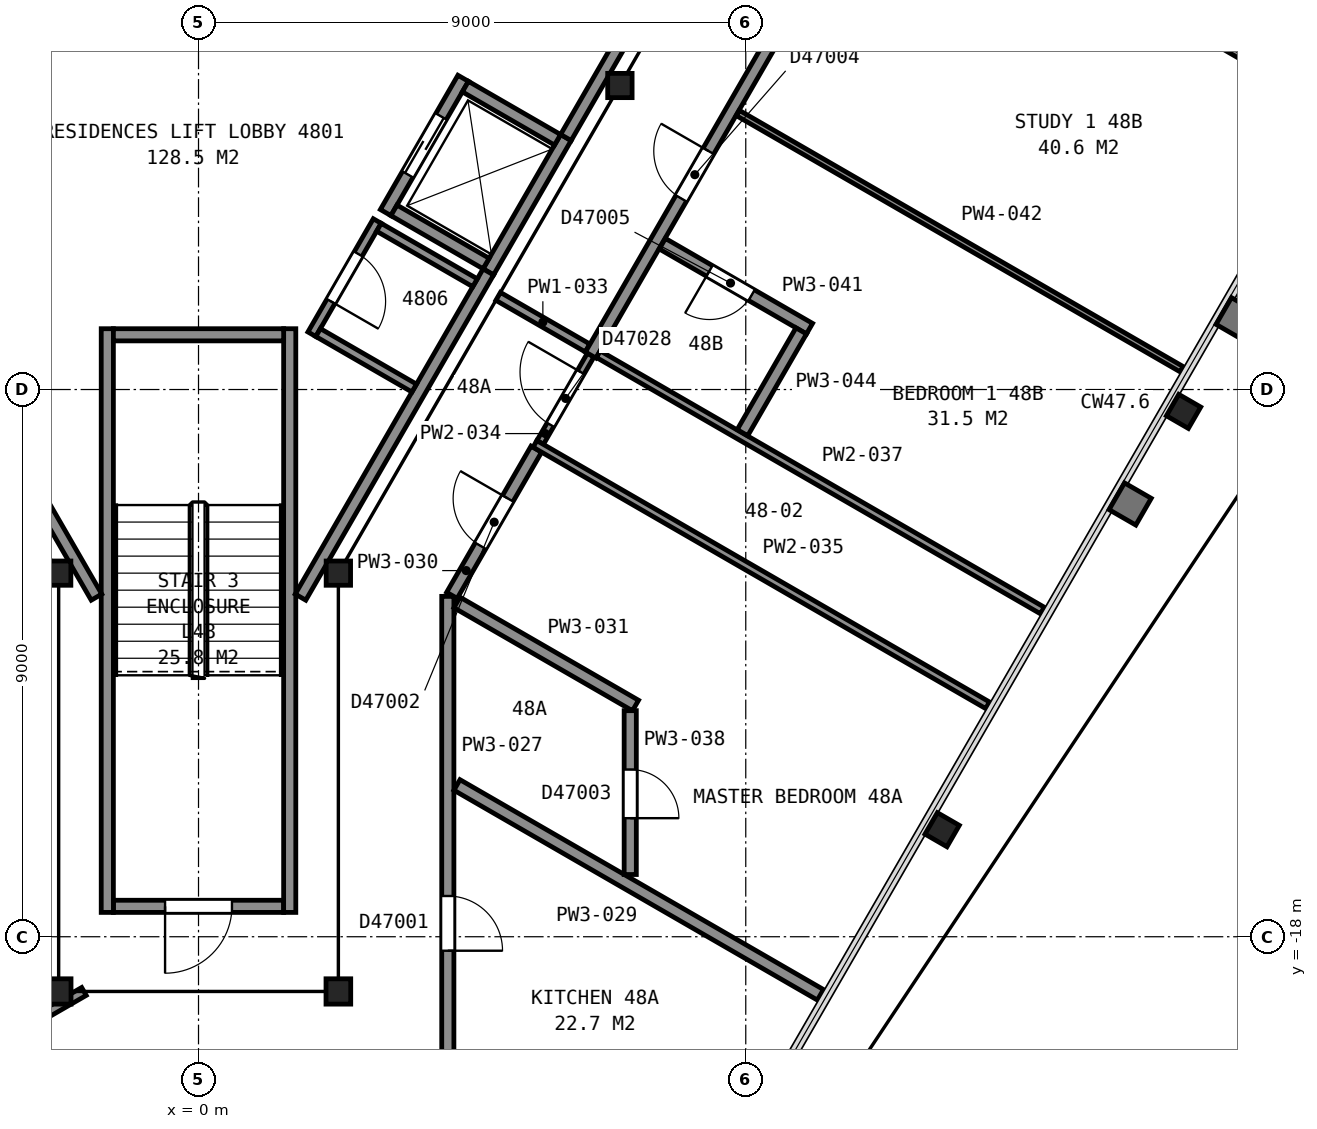
"""IFC4 building model, lengths in metres.
Left out: names, types, materials, properties, quantities, classifications, styles, units other than length and angle.
Written with IfcOpenShell. Run it as: python <this file> out.ifc"""

import sys

from ifc_helpers import new_model, si_unit, direction, frame, frame_2d, origin, origin_2d, place, context, subcontext, project, spatial, rectangle, i_section, extrude, element, fill, save


model = new_model("IFC4")
c1 = context("Model", 3, precision=1e-05, world=origin(), true_north=direction((0.0, 1.0)))
c2 = subcontext(c1, "Body", "Model", "MODEL_VIEW")
j1 = project(units=[si_unit("LENGTHUNIT", "METRE"), si_unit("PLANEANGLEUNIT", "RADIAN")], contexts=[c1])
p1 = place(None, origin())
s1 = spatial("IfcSite", under=j1, at=p1, CompositionType="ELEMENT")
p2 = place(p1, origin())
s2 = spatial("IfcBuilding", under=s1, at=p2, CompositionType="ELEMENT")
p3 = place(p2, frame((0.0, 0.0, 193.2)))
s3 = spatial("IfcBuildingStorey", under=s2, at=p3, CompositionType="ELEMENT", Elevation=193.2)
for number, where, z_axis, x_axis in (
    (1, (12.23, -16.24, 0.0), (0.0, 0.0, 1.0), (-0.5, -0.866, 0.0)),
    (2, (16.2, -9.36, 0.0), (0.0, 0.0, 1.0), (-0.5, -0.866, 0.0)),
):
    element("IfcColumn", number, at=place(p3, frame(where, z_axis=z_axis, x_axis=x_axis)), inside=s3, PredefinedType="COLUMN", context=c2, shape_type="SweptSolid", body=[
        extrude(i_section(OverallWidth=0.406, OverallDepth=0.417, WebThickness=0.03, FlangeThickness=0.048, FilletRadius=0.015, at=origin_2d()), origin(), (0.0, 0.0, 1.0), 3.7),
    ])
p4 = place(p3, frame((-2.3, -12.02, 0.0), z_axis=(0.0, 0.0, 1.0), x_axis=(1.0, 0.0, 0.0)))
e3 = element("IfcColumn", 3, at=p4, inside=s3, PredefinedType="COLUMN", context=c2, shape_type="SweptSolid", body=[
    extrude(i_section(OverallWidth=0.401, OverallDepth=0.399, WebThickness=0.025, FlangeThickness=0.04, FilletRadius=0.015, at=origin_2d()), origin(), (0.0, 0.0, 1.0), 3.7),
])
for number, where, z_axis, x_axis in (
    (4, (-2.3, -18.9, 0.0), (0.0, 0.0, 1.0), (-1.0, 0.0, 0.0)),
    (5, (2.3, -18.9, 0.0), (0.0, 0.0, 1.0), (-1.0, 0.0, 0.0)),
):
    element("IfcColumn", number, at=place(p3, frame(where, z_axis=z_axis, x_axis=x_axis)), inside=s3, PredefinedType="COLUMN", context=c2, shape_type="SweptSolid", body=[
        extrude(i_section(OverallWidth=0.406, OverallDepth=0.417, WebThickness=0.03, FlangeThickness=0.048, FilletRadius=0.015, at=origin_2d()), origin(), (0.0, 0.0, 1.0), 3.7),
    ])
for number, where, z_axis, x_axis in (
    (6, (2.3, -12.02, 0.0), (0.0, 0.0, 1.0), (1.0, 0.0, 0.0)),
    (7, (6.93, -4.0, 0.0), (0.0, 0.0, 1.0), (1.0, 0.0, 0.0)),
):
    element("IfcColumn", number, at=place(p3, frame(where, z_axis=z_axis, x_axis=x_axis)), inside=s3, PredefinedType="COLUMN", context=c2, shape_type="SweptSolid", body=[
        extrude(i_section(OverallWidth=0.401, OverallDepth=0.399, WebThickness=0.025, FlangeThickness=0.04, FilletRadius=0.015, at=origin_2d()), origin(), (0.0, 0.0, 1.0), 3.7),
    ])
p5 = place(p3, frame((-1.4, -17.5, 0.0), z_axis=(0.0, 0.0, 1.0), x_axis=(1.0, 0.0, 0.0)))
e8 = element("IfcWall", 8, at=p5, inside=s3, PredefinedType="PARTITIONING", context=c2, shape_type="SweptSolid", body=[
    extrude(rectangle(XDim=2.8, YDim=0.2, at=frame_2d((1.4, 0.0))), origin(), (0.0, 0.0, 1.0), 3.45),
])
p6 = place(p5, frame((0.85, 0.0, 0.0)))
e9 = element("IfcOpeningElement", 9, at=p6, cuts=e8, PredefinedType="OPENING", context=c2, shape_type="SweptSolid", body=[
    extrude(rectangle(XDim=1.1, YDim=2.1, at=frame_2d((0.55, 1.05))), frame((0.0, 0.11, 0.0), z_axis=(0.0, -1.0, 0.0), x_axis=(1.0, 0.0, 0.0)), (0.0, 0.0, 1.0), 0.22),
])
for number, where, z_axis, x_axis in (
    (10, (1.5, -8.0, 0.0), (0.0, 0.0, 1.0), (0.0, -1.0, 0.0)),
    (11, (-1.5, -8.0, 0.0), (0.0, 0.0, 1.0), (0.0, -1.0, 0.0)),
):
    element("IfcWall", number, at=place(p3, frame(where, z_axis=z_axis, x_axis=x_axis)), inside=s3, PredefinedType="PARTITIONING", context=c2, shape_type="SweptSolid", body=[
        extrude(rectangle(XDim=9.6, YDim=0.2, at=frame_2d((4.8, 0.0))), origin(), (0.0, 0.0, 1.0), 3.45),
    ])
p7 = place(p3, frame((-1.4, -8.1, 0.0), z_axis=(0.0, 0.0, 1.0), x_axis=(1.0, 0.0, 0.0)))
e12 = element("IfcWall", 12, at=p7, inside=s3, PredefinedType="PARTITIONING", context=c2, shape_type="SweptSolid", body=[
    extrude(rectangle(XDim=2.8, YDim=0.2, at=frame_2d((1.4, 0.0))), origin(), (0.0, 0.0, 1.0), 3.45),
])
p8 = place(p3, frame((4.766, -7.065, 0.0), z_axis=(0.0, 0.0, 1.0), x_axis=(0.499948979701, 0.866054858364, 0.0)))
e13 = element("IfcWall", 13, at=p8, inside=s3, PredefinedType="PARTITIONING", context=c2, shape_type="SweptSolid", body=[
    extrude(rectangle(XDim=2.55, YDim=0.2, at=frame_2d((1.275, 0.0))), origin(), (0.0, 0.0, 1.0), 3.7),
])
p9 = place(p3, frame((3.077, -6.09, 0.0), z_axis=(0.0, 0.0, 1.0), x_axis=(0.500062241894, 0.865989465428, 0.0)))
e14 = element("IfcWall", 14, at=p9, inside=s3, PredefinedType="PARTITIONING", context=c2, shape_type="SweptSolid", body=[
    extrude(rectangle(XDim=2.55, YDim=0.2, at=frame_2d((1.275, 0.0))), origin(), (0.0, 0.0, 1.0), 3.7),
])
p10 = place(p9, frame((0.725, 0.0, 0.0)))
e15 = element("IfcOpeningElement", 15, at=p10, cuts=e14, PredefinedType="OPENING", context=c2, shape_type="SweptSolid", body=[
    extrude(rectangle(XDim=1.1, YDim=2.1, at=frame_2d((0.55, 1.05))), frame((0.0, 0.11, 0.0), z_axis=(0.0, -1.0, 0.0), x_axis=(1.0, 0.0, 0.0)), (0.0, 0.0, 1.0), 0.22),
])
p11 = place(p3, frame((5.905, -4.893, 0.0), z_axis=(0.0, 0.0, 1.0), x_axis=(-0.866002029911, 0.500040482552, 0.0)))
e16 = element("IfcWall", 16, at=p11, inside=s3, PredefinedType="PARTITIONING", context=c2, shape_type="SweptSolid", body=[
    extrude(rectangle(XDim=1.75, YDim=0.2, at=frame_2d((0.875, 0.0))), origin(), (0.0, 0.0, 1.0), 3.7),
])
p12 = place(p3, frame((4.73, -6.928, 0.0), z_axis=(0.0, 0.0, 1.0), x_axis=(-0.866036909293, 0.499980071345, 0.0)))
e17 = element("IfcWall", 17, at=p12, inside=s3, PredefinedType="PARTITIONING", context=c2, shape_type="SweptSolid", body=[
    extrude(rectangle(XDim=1.75, YDim=0.2, at=frame_2d((0.875, 0.0))), origin(), (0.0, 0.0, 1.0), 3.7),
])
p13 = place(p3, frame((-4.655, -7.257, 0.0), z_axis=(0.0, 0.0, 1.0), x_axis=(0.499966124405, -0.866044960985, 0.0)))
e18 = element("IfcWall", 18, at=p13, inside=s3, PredefinedType="PARTITIONING", context=c2, shape_type="SweptSolid", body=[
    extrude(rectangle(XDim=5.956, YDim=0.2, at=frame_2d((2.978, 0.0))), origin(), (0.0, 0.0, 1.0), 3.45),
])
p14 = place(p13, frame((0.45, 0.0, 0.0)))
e19 = element("IfcOpeningElement", 19, at=p14, cuts=e18, PredefinedType="OPENING", context=c2, shape_type="SweptSolid", body=[
    extrude(rectangle(XDim=1.8, YDim=2.1, at=frame_2d((0.9, 1.05))), frame((0.0, 0.11, 0.0), z_axis=(0.0, -1.0, 0.0), x_axis=(1.0, 0.0, 0.0)), (0.0, 0.0, 1.0), 0.22),
])
p15 = place(p3, frame((1.677, -12.415, 0.0), z_axis=(0.0, 0.0, 1.0), x_axis=(0.500054337157, 0.865994029939, 0.0)))
e20 = element("IfcWall", 20, at=p15, inside=s3, PredefinedType="PARTITIONING", context=c2, shape_type="SweptSolid", body=[
    extrude(rectangle(XDim=6.177, YDim=0.2, at=frame_2d((3.088, 0.0))), origin(), (0.0, 0.0, 1.0), 3.45),
])
p16 = place(p3, frame((2.939, -6.229, 0.0), z_axis=(0.0, 0.0, 1.0), x_axis=(-0.499961633463, -0.866047553582, 0.0)))
e21 = element("IfcWall", 21, at=p16, inside=s3, PredefinedType="PARTITIONING", context=c2, shape_type="SweptSolid", body=[
    extrude(rectangle(XDim=2.15, YDim=0.15, at=frame_2d((1.075, 0.0))), origin(), (0.0, 0.0, 1.0), 3.45),
])
p17 = place(p16, frame((0.625, 0.0, 0.0)))
e22 = element("IfcOpeningElement", 22, at=p17, cuts=e21, PredefinedType="OPENING", context=c2, shape_type="SweptSolid", body=[
    extrude(rectangle(XDim=0.9, YDim=2.1, at=frame_2d((0.45, 1.05))), frame((0.0, 0.085, 0.0), z_axis=(0.0, -1.0, 0.0), x_axis=(1.0, 0.0, 0.0)), (0.0, 0.0, 1.0), 0.17),
])
p18 = place(p3, frame((1.967, -8.063, 0.0), z_axis=(0.0, 0.0, 1.0), x_axis=(0.865978377894, -0.500081442387, 0.0)))
e23 = element("IfcWall", 23, at=p18, inside=s3, PredefinedType="PARTITIONING", context=c2, shape_type="SweptSolid", body=[
    extrude(rectangle(XDim=1.825, YDim=0.15, at=frame_2d((0.913, 0.0))), origin(), (0.0, 0.0, 1.0), 3.45),
])
p19 = place(p3, frame((2.967, -6.332, 0.0), z_axis=(0.0, 0.0, 1.0), x_axis=(0.866036312054, -0.499981105847, 0.0)))
e24 = element("IfcWall", 24, at=p19, inside=s3, PredefinedType="PARTITIONING", context=c2, shape_type="SweptSolid", body=[
    extrude(rectangle(XDim=1.825, YDim=0.15, at=frame_2d((0.912, 0.0))), origin(), (0.0, 0.0, 1.0), 3.45),
])
p20 = place(p3, frame((6.042, -4.855, 0.0), z_axis=(0.0, 0.0, 1.0), x_axis=(0.500252727967, 0.865879442048, 0.0)))
e25 = element("IfcWall", 25, at=p20, inside=s3, PredefinedType="PARTITIONING", context=c2, shape_type="SweptSolid", body=[
    extrude(rectangle(XDim=2.617, YDim=0.2, at=frame_2d((1.309, 0.0))), origin(), (0.0, 0.0, 1.0), 3.45),
])
p21 = place(p3, frame((-4.046, -20.149, 0.0), z_axis=(0.0, 0.0, 1.0), x_axis=(0.865916841101, 0.500187988959, 0.0)))
e26 = element("IfcWall", 26, at=p21, inside=s3, PredefinedType="PARTITIONING", context=c2, shape_type="SweptSolid", body=[
    extrude(rectangle(XDim=2.497, YDim=0.15, at=frame_2d((1.248, 0.0))), origin(), (0.0, 0.0, 1.0), 2.713),
])
p22 = place(p3, frame((4.1, -12.402, 0.0), z_axis=(0.0, 0.0, 1.0), x_axis=(0.0, -1.0, 0.0)))
e27 = element("IfcWall", 27, at=p22, inside=s3, PredefinedType="PARTITIONING", context=c2, shape_type="SweptSolid", body=[
    extrude(rectangle(XDim=8.248, YDim=0.2, at=frame_2d((4.124, 0.0))), origin(), (0.0, 0.0, 1.0), 2.713),
])
p23 = place(p22, frame((4.928, 0.0, 0.0)))
e28 = element("IfcOpeningElement", 28, at=p23, cuts=e27, PredefinedType="OPENING", context=c2, shape_type="SweptSolid", body=[
    extrude(rectangle(XDim=0.9, YDim=2.1, at=frame_2d((0.45, 1.05))), frame((0.0, 0.11, 0.0), z_axis=(0.0, -1.0, 0.0), x_axis=(1.0, 0.0, 0.0)), (0.0, 0.0, 1.0), 0.22),
])
p24 = place(p3, frame((4.25, -15.504, 0.0), z_axis=(0.0, 0.0, 1.0), x_axis=(0.866025383743, -0.500000034713, 0.0)))
e29 = element("IfcWall", 29, at=p24, inside=s3, PredefinedType="PARTITIONING", context=c2, shape_type="SweptSolid", body=[
    extrude(rectangle(XDim=6.903, YDim=0.2, at=frame_2d((3.451, 0.0))), origin(), (0.0, 0.0, 1.0), 2.713),
])
p25 = place(p3, frame((5.556, -9.98, 0.0), z_axis=(0.0, 0.0, 1.0), x_axis=(-0.499940639567, -0.866059672834, 0.0)))
e30 = element("IfcWall", 30, at=p25, inside=s3, PredefinedType="PARTITIONING", context=c2, shape_type="SweptSolid", body=[
    extrude(rectangle(XDim=2.777, YDim=0.2, at=frame_2d((1.388, 0.0))), origin(), (0.0, 0.0, 1.0), 2.713),
])
p26 = place(p25, frame((0.937, 0.0, 0.0)))
e31 = element("IfcOpeningElement", 31, at=p26, cuts=e30, PredefinedType="OPENING", context=c2, shape_type="SweptSolid", body=[
    extrude(rectangle(XDim=0.9, YDim=2.1, at=frame_2d((0.45, 1.05))), frame((0.0, 0.11, 0.0), z_axis=(0.0, -1.0, 0.0), x_axis=(1.0, 0.0, 0.0)), (0.0, 0.0, 1.0), 0.22),
])
p27 = place(p3, frame((4.25, -12.502, 0.0), z_axis=(0.0, 0.0, 1.0), x_axis=(0.866032087317, -0.499988423603, 0.0)))
e32 = element("IfcWall", 32, at=p27, inside=s3, PredefinedType="PARTITIONING", context=c2, shape_type="SweptSolid", body=[
    extrude(rectangle(XDim=3.39, YDim=0.2, at=frame_2d((1.695, 0.0))), origin(), (0.0, 0.0, 1.0), 2.713),
])
p28 = place(p3, frame((4.928, -7.468, 0.0), z_axis=(0.0, 0.0, 1.0), x_axis=(0.866075426483, -0.499913348133, 0.0)))
e33 = element("IfcWall", 33, at=p28, inside=s3, PredefinedType="PARTITIONING", context=c2, shape_type="SweptSolid", body=[
    extrude(rectangle(XDim=1.698, YDim=0.15, at=frame_2d((0.849, 0.0))), origin(), (0.0, 0.0, 1.0), 2.713),
])
p29 = place(p3, frame((5.62, -9.87, 0.0), z_axis=(0.0, 0.0, 1.0), x_axis=(0.500142759665, 0.865942965763, 0.0)))
e34 = element("IfcWall", 34, at=p29, inside=s3, PredefinedType="PARTITIONING", context=c2, shape_type="SweptSolid", body=[
    extrude(rectangle(XDim=1.659, YDim=0.125, at=frame_2d((0.83, 0.0))), origin(), (0.0, 0.0, 1.0), 2.713),
])
p30 = place(p29, frame((0.335, 0.0, 0.0)))
e35 = element("IfcOpeningElement", 35, at=p30, cuts=e34, PredefinedType="OPENING", context=c2, shape_type="SweptSolid", body=[
    extrude(rectangle(XDim=1.0, YDim=2.1, at=frame_2d((0.5, 1.05))), frame((0.0, 0.073, 0.0), z_axis=(0.0, -1.0, 0.0), x_axis=(1.0, 0.0, 0.0)), (0.0, 0.0, 1.0), 0.145),
])
p31 = place(p3, frame((5.533, -9.895, 0.0), z_axis=(0.0, 0.0, 1.0), x_axis=(0.865995449608, -0.500051878567, 0.0)))
e36 = element("IfcWall", 36, at=p31, inside=s3, PredefinedType="PARTITIONING", context=c2, shape_type="SweptSolid", body=[
    extrude(rectangle(XDim=8.596, YDim=0.125, at=frame_2d((4.298, 0.0))), origin(), (0.0, 0.0, 1.0), 2.713),
])
p32 = place(p3, frame((12.903, 2.745, 0.0), z_axis=(0.0, 0.0, 1.0), x_axis=(-0.499992063946, -0.866029985619, 0.0)))
e37 = element("IfcWall", 37, at=p32, inside=s3, PredefinedType="PARTITIONING", context=c2, shape_type="SweptSolid", body=[
    extrude(rectangle(XDim=12.907, YDim=0.2, at=frame_2d((6.454, 0.0))), origin(), (0.0, 0.0, 1.0), 2.713),
])
p33 = place(p32, frame((9.032, 0.0, 0.0)))
e38 = element("IfcOpeningElement", 38, at=p33, cuts=e37, PredefinedType="OPENING", context=c2, shape_type="SweptSolid", body=[
    extrude(rectangle(XDim=0.9, YDim=2.1, at=frame_2d((0.45, 1.05))), frame((0.0, 0.11, 0.0), z_axis=(0.0, -1.0, 0.0), x_axis=(1.0, 0.0, 0.0)), (0.0, 0.0, 1.0), 0.22),
])
p34 = place(p32, frame((5.349, 0.0, 0.0)))
e39 = element("IfcOpeningElement", 39, at=p34, cuts=e37, PredefinedType="OPENING", context=c2, shape_type="SweptSolid", body=[
    extrude(rectangle(XDim=0.9, YDim=2.1, at=frame_2d((0.45, 1.05))), frame((0.0, 0.11, 0.0), z_axis=(0.0, -1.0, 0.0), x_axis=(1.0, 0.0, 0.0)), (0.0, 0.0, 1.0), 0.22),
])
p35 = place(p3, frame((6.576, -8.419, 0.0), z_axis=(0.0, 0.0, 1.0), x_axis=(0.866048155274, -0.499960591193, 0.0)))
e40 = element("IfcWall", 40, at=p35, inside=s3, PredefinedType="PARTITIONING", context=c2, shape_type="SweptSolid", body=[
    extrude(rectangle(XDim=8.431, YDim=0.125, at=frame_2d((4.215, 0.0))), origin(), (0.0, 0.0, 1.0), 2.713),
])
p36 = place(p3, frame((7.1, -16.977, 0.0), z_axis=(0.0, 0.0, 1.0), x_axis=(0.0, 1.0, 0.0)))
e41 = element("IfcWall", 41, at=p36, inside=s3, PredefinedType="PARTITIONING", context=c2, shape_type="SweptSolid", body=[
    extrude(rectangle(XDim=2.695, YDim=0.2, at=frame_2d((1.347, 0.0))), origin(), (0.0, 0.0, 1.0), 2.713),
])
p37 = place(p36, frame((0.927, 0.0, 0.0)))
e42 = element("IfcOpeningElement", 42, at=p37, cuts=e41, PredefinedType="OPENING", context=c2, shape_type="SweptSolid", body=[
    extrude(rectangle(XDim=0.8, YDim=2.1, at=frame_2d((0.4, 1.05))), frame((0.0, 0.11, 0.0), z_axis=(0.0, -1.0, 0.0), x_axis=(1.0, 0.0, 0.0)), (0.0, 0.0, 1.0), 0.22),
])
p38 = place(p3, frame((10.049, -7.999, 0.0), z_axis=(0.0, 0.0, 1.0), x_axis=(-0.866041588165, 0.499971966783, 0.0)))
e43 = element("IfcWall", 43, at=p38, inside=s3, PredefinedType="PARTITIONING", context=c2, shape_type="SweptSolid", body=[
    extrude(rectangle(XDim=2.795, YDim=0.2, at=frame_2d((1.397, 0.0))), origin(), (0.0, 0.0, 1.0), 2.713),
])
p39 = place(p38, frame((1.1, 0.0, 0.0)))
e44 = element("IfcOpeningElement", 44, at=p39, cuts=e43, PredefinedType="OPENING", context=c2, shape_type="SweptSolid", body=[
    extrude(rectangle(XDim=0.8, YDim=2.1, at=frame_2d((0.4, 1.05))), frame((0.0, 0.11, 0.0), z_axis=(0.0, -1.0, 0.0), x_axis=(1.0, 0.0, 0.0)), (0.0, 0.0, 1.0), 0.22),
])
p40 = place(p3, frame((8.869, -4.451, 0.0), z_axis=(0.0, 0.0, 1.0), x_axis=(0.866027858276, -0.499995748672, 0.0)))
e45 = element("IfcWall", 45, at=p40, inside=s3, PredefinedType="PARTITIONING", context=c2, shape_type="SweptSolid", body=[
    extrude(rectangle(XDim=8.429, YDim=0.1, at=frame_2d((4.214, 0.0))), origin(), (0.0, 0.0, 1.0), 2.713),
])
p41 = place(p3, frame((8.946, -9.709, 0.0), z_axis=(0.0, 0.0, 1.0), x_axis=(0.499970304126, 0.866042548026, 0.0)))
e46 = element("IfcWall", 46, at=p41, inside=s3, PredefinedType="PARTITIONING", context=c2, shape_type="SweptSolid", body=[
    extrude(rectangle(XDim=1.933, YDim=0.2, at=frame_2d((0.966, 0.0))), origin(), (0.0, 0.0, 1.0), 2.713),
])
p42 = place(p3, frame((11.343, -0.166, 0.0), z_axis=(0.0, 0.0, 1.0), x_axis=(0.866022557401, -0.500004930048, 0.0)))
e47 = element("IfcWall", 47, at=p42, inside=s3, PredefinedType="PARTITIONING", context=c2, shape_type="SweptSolid", body=[
    extrude(rectangle(XDim=8.429, YDim=0.1, at=frame_2d((4.215, 0.0))), origin(), (0.0, 0.0, 1.0), 2.713),
])
p43 = place(p6, origin())
e48 = element("IfcDoor", 48, at=p43, inside=s3, OperationType="SINGLE_SWING_LEFT", PredefinedType="DOOR", context=c2, shape_type="SweptSolid", body=[
    extrude(rectangle(XDim=1.1, YDim=2.1, at=frame_2d((0.55, 1.05))), frame((0.0, 0.025, 0.0), z_axis=(0.0, -1.0, 0.0), x_axis=(1.0, 0.0, 0.0)), (0.0, 0.0, 1.0), 0.05),
])
fill(e9, e48)
p44 = place(p10, origin())
e49 = element("IfcDoor", 49, at=p44, inside=s3, OperationType="SLIDING_TO_LEFT", PredefinedType="DOOR", context=c2, shape_type="SweptSolid", body=[
    extrude(rectangle(XDim=1.1, YDim=2.1, at=frame_2d((0.55, 1.05))), frame((0.0, 0.025, 0.0), z_axis=(0.0, -1.0, 0.0), x_axis=(1.0, 0.0, 0.0)), (0.0, 0.0, 1.0), 0.05),
])
fill(e15, e49)
p45 = place(p17, origin())
e50 = element("IfcDoor", 50, at=p45, inside=s3, OperationType="SINGLE_SWING_RIGHT", PredefinedType="DOOR", context=c2, shape_type="SweptSolid", body=[
    extrude(rectangle(XDim=0.9, YDim=2.1, at=frame_2d((0.45, 1.05))), frame((0.0, 0.025, 0.0), z_axis=(0.0, -1.0, 0.0), x_axis=(1.0, 0.0, 0.0)), (0.0, 0.0, 1.0), 0.05),
])
fill(e22, e50)
p46 = place(p23, origin())
e51 = element("IfcDoor", 51, at=p46, inside=s3, OperationType="SINGLE_SWING_RIGHT", PredefinedType="DOOR", context=c2, shape_type="SweptSolid", body=[
    extrude(rectangle(XDim=0.9, YDim=2.1, at=frame_2d((0.45, 1.05))), frame((0.0, 0.025, 0.0), z_axis=(0.0, -1.0, 0.0), x_axis=(1.0, 0.0, 0.0)), (0.0, 0.0, 1.0), 0.05),
])
fill(e28, e51)
p47 = place(p26, origin())
e52 = element("IfcDoor", 52, at=p47, inside=s3, OperationType="SINGLE_SWING_LEFT", PredefinedType="DOOR", context=c2, shape_type="SweptSolid", body=[
    extrude(rectangle(XDim=0.9, YDim=2.1, at=frame_2d((0.45, 1.05))), frame((0.0, 0.025, 0.0), z_axis=(0.0, -1.0, 0.0), x_axis=(1.0, 0.0, 0.0)), (0.0, 0.0, 1.0), 0.05),
])
fill(e31, e52)
p48 = place(p30, origin())
e53 = element("IfcDoor", 53, at=p48, inside=s3, OperationType="SINGLE_SWING_RIGHT", PredefinedType="DOOR", context=c2, shape_type="SweptSolid", body=[
    extrude(rectangle(XDim=1.0, YDim=2.1, at=frame_2d((0.5, 1.05))), frame((0.0, 0.025, 0.0), z_axis=(0.0, -1.0, 0.0), x_axis=(1.0, 0.0, 0.0)), (0.0, 0.0, 1.0), 0.05),
])
fill(e35, e53)
p49 = place(p33, origin())
e54 = element("IfcDoor", 54, at=p49, inside=s3, OperationType="SINGLE_SWING_LEFT", PredefinedType="DOOR", context=c2, shape_type="SweptSolid", body=[
    extrude(rectangle(XDim=0.9, YDim=2.1, at=frame_2d((0.45, 1.05))), frame((0.0, 0.025, 0.0), z_axis=(0.0, -1.0, 0.0), x_axis=(1.0, 0.0, 0.0)), (0.0, 0.0, 1.0), 0.05),
])
fill(e38, e54)
p50 = place(p37, origin())
e55 = element("IfcDoor", 55, at=p50, inside=s3, OperationType="SINGLE_SWING_LEFT", PredefinedType="DOOR", context=c2, shape_type="SweptSolid", body=[
    extrude(rectangle(XDim=0.8, YDim=2.1, at=frame_2d((0.4, 1.05))), frame((0.0, 0.025, 0.0), z_axis=(0.0, -1.0, 0.0), x_axis=(1.0, 0.0, 0.0)), (0.0, 0.0, 1.0), 0.05),
])
fill(e42, e55)
p51 = place(p39, origin())
e56 = element("IfcDoor", 56, at=p51, inside=s3, OperationType="SINGLE_SWING_RIGHT", PredefinedType="DOOR", context=c2, shape_type="SweptSolid", body=[
    extrude(rectangle(XDim=0.8, YDim=2.1, at=frame_2d((0.4, 1.05))), frame((0.0, 0.025, 0.0), z_axis=(0.0, -1.0, 0.0), x_axis=(1.0, 0.0, 0.0)), (0.0, 0.0, 1.0), 0.05),
])
fill(e44, e56)
save(model, sys.argv[1])
